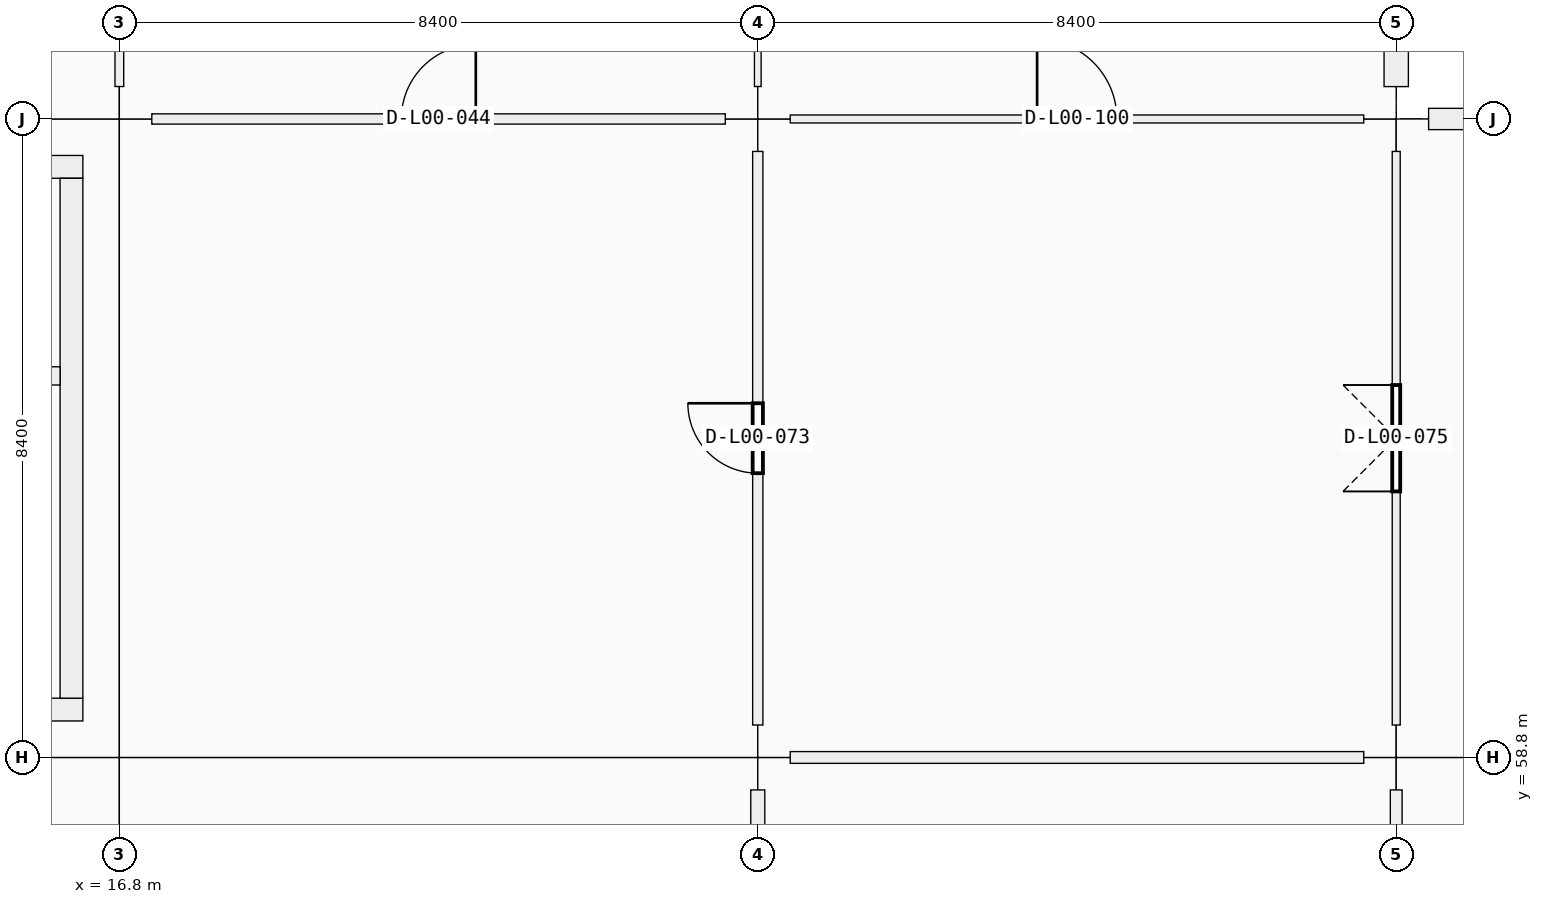
"""IFC4 building model, lengths in metres.
Left out: names, types, materials, properties, quantities, classifications, styles, units other than length and angle.
Written with IfcOpenShell. Run it as: python <this file> out.ifc"""

import sys

from ifc_helpers import new_model, si_unit, direction, frame, frame_2d, origin, origin_2d, place, context, subcontext, project, spatial, rectangle, extrude, element, fill, save


model = new_model("IFC4")
c1 = context("Model", 3, precision=1e-05, world=origin(), true_north=direction((0.0, 1.0)))
c2 = subcontext(c1, "Body", "Model", "MODEL_VIEW")
j1 = project(units=[si_unit("LENGTHUNIT", "METRE"), si_unit("PLANEANGLEUNIT", "RADIAN")], contexts=[c1])
p1 = place(None, origin())
s1 = spatial("IfcSite", under=j1, at=p1, CompositionType="ELEMENT")
p2 = place(p1, origin())
s2 = spatial("IfcBuilding", under=s1, at=p2, CompositionType="ELEMENT")
p3 = place(p2, origin())
s3 = spatial("IfcBuildingStorey", under=s2, at=p3, CompositionType="ELEMENT", Elevation=0.0)
for number, where, z_axis, x_axis in (
    (1, (16.8, 58.8, 0.0), (0.0, 0.0, 1.0), (1.0, 0.0, 0.0)),
    (2, (16.8, 67.2, 0.0), (0.0, 0.0, 1.0), (1.0, 0.0, 0.0)),
    (3, (25.2, 58.8, 0.0), (0.0, 0.0, 1.0), (1.0, 0.0, 0.0)),
    (4, (25.2, 67.2, 0.0), (0.0, 0.0, 1.0), (1.0, 0.0, 0.0)),
    (5, (33.6, 58.8, 0.0), (0.0, 0.0, 1.0), (1.0, 0.0, 0.0)),
    (6, (33.6, 67.2, 0.0), (0.0, 0.0, 1.0), (1.0, 0.0, 0.0)),
):
    element("IfcColumn", number, at=place(p3, frame(where, z_axis=z_axis, x_axis=x_axis)), inside=s3, PredefinedType="COLUMN", context=c2, shape_type="SweptSolid", body=[
        extrude(rectangle(XDim=0.85, YDim=0.85, at=origin_2d()), origin(), (0.0, 0.0, 1.0), 5.76),
    ])
p4 = place(p3, frame((33.6, 75.174, 0.0), z_axis=(0.0, 0.0, 1.0), x_axis=(0.0, -1.0, 0.0)))
e7 = element("IfcWall", 7, at=p4, inside=s3, PredefinedType="SOLIDWALL", context=c2, shape_type="SweptSolid", body=[
    extrude(rectangle(XDim=7.548, YDim=0.32, at=frame_2d((3.774, 0.0))), origin(), (0.0, 0.0, 1.0), 4.7),
])
p5 = place(p4, frame((2.824, 0.0, 0.9)))
e8 = element("IfcOpeningElement", 8, at=p5, cuts=e7, PredefinedType="OPENING", context=c2, shape_type="SweptSolid", body=[
    extrude(rectangle(XDim=1.9, YDim=1.75, at=frame_2d((0.95, 0.875))), frame((0.0, 0.16, 0.0), z_axis=(0.0, -1.0, 0.0), x_axis=(1.0, 0.0, 0.0)), (0.0, 0.0, 1.0), 0.32),
])
p6 = place(p3, frame((34.026, 67.2, 0.0), z_axis=(0.0, 0.0, 1.0), x_axis=(1.0, 0.0, 0.0)))
e9 = element("IfcWall", 9, at=p6, inside=s3, PredefinedType="SOLIDWALL", context=c2, shape_type="SweptSolid", body=[
    extrude(rectangle(XDim=7.548, YDim=0.28, at=frame_2d((3.774, 0.0))), origin(), (0.0, 0.0, 1.0), 4.7),
])
p7 = place(p6, frame((3.074, 0.0, 0.9)))
e10 = element("IfcOpeningElement", 10, at=p7, cuts=e9, PredefinedType="OPENING", context=c2, shape_type="SweptSolid", body=[
    extrude(rectangle(XDim=1.4, YDim=1.75, at=frame_2d((0.7, 0.875))), frame((0.0, 0.14, 0.0), z_axis=(0.0, -1.0, 0.0), x_axis=(1.0, 0.0, 0.0)), (0.0, 0.0, 1.0), 0.28),
])
p8 = place(p3, frame((16.32, 59.43, 0.0), z_axis=(0.0, 0.0, 1.0), x_axis=(-1.0, 0.0, 0.0)))
e11 = element("IfcWall", 11, at=p8, inside=s3, PredefinedType="SHEAR", context=c2, shape_type="SweptSolid", body=[
    extrude(rectangle(XDim=7.44, YDim=0.3, at=frame_2d((3.72, 0.0))), origin(), (0.0, 0.0, 1.0), 5.76),
])
p9 = place(p8, frame((1.28, 0.0, 0.0)))
e12 = element("IfcOpeningElement", 12, at=p9, cuts=e11, PredefinedType="OPENING", context=c2, shape_type="SweptSolid", body=[
    extrude(rectangle(XDim=1.5, YDim=2.15, at=frame_2d((0.75, 1.075))), frame((0.0, 0.15, 0.0), z_axis=(0.0, -1.0, 0.0), x_axis=(1.0, 0.0, 0.0)), (0.0, 0.0, 1.0), 0.3),
])
p10 = place(p3, frame((8.88, 66.57, 0.0), z_axis=(0.0, 0.0, 1.0), x_axis=(1.0, 0.0, 0.0)))
e13 = element("IfcWall", 13, at=p10, inside=s3, PredefinedType="SHEAR", context=c2, shape_type="SweptSolid", body=[
    extrude(rectangle(XDim=7.44, YDim=0.3, at=frame_2d((3.72, 0.0))), origin(), (0.0, 0.0, 1.0), 5.76),
])
p11 = place(p3, frame((16.17, 66.42, 0.0), z_axis=(0.0, 0.0, 1.0), x_axis=(0.0, -1.0, 0.0)))
e14 = element("IfcWall", 14, at=p11, inside=s3, PredefinedType="SHEAR", context=c2, shape_type="SweptSolid", body=[
    extrude(rectangle(XDim=6.84, YDim=0.3, at=frame_2d((3.42, 0.0))), origin(), (0.0, 0.0, 1.0), 5.76),
])
p12 = place(p3, frame((12.56, 63.82, 0.0), z_axis=(0.0, 0.0, 1.0), x_axis=(1.0, 0.0, 0.0)))
e15 = element("IfcWall", 15, at=p12, inside=s3, PredefinedType="SHEAR", context=c2, shape_type="SweptSolid", body=[
    extrude(rectangle(XDim=3.46, YDim=0.24, at=frame_2d((1.73, 0.0))), origin(), (0.0, 0.0, 1.0), 5.76),
])
p13 = place(p12, frame((1.18, 0.0, 0.0)))
e16 = element("IfcOpeningElement", 16, at=p13, cuts=e15, PredefinedType="OPENING", context=c2, shape_type="SweptSolid", body=[
    extrude(rectangle(XDim=1.1, YDim=2.15, at=frame_2d((0.55, 1.075))), frame((0.0, 0.12, 0.0), z_axis=(0.0, -1.0, 0.0), x_axis=(1.0, 0.0, 0.0)), (0.0, 0.0, 1.0), 0.24),
])
p14 = place(p3, frame((17.227, 67.2, 0.0), z_axis=(0.0, 0.0, 1.0), x_axis=(1.0, 0.0, 0.0)))
e17 = element("IfcWall", 17, at=p14, inside=s3, PredefinedType="PARTITIONING", context=c2, shape_type="SweptSolid", body=[
    extrude(rectangle(XDim=7.546, YDim=0.135, at=frame_2d((3.773, 0.0))), origin(), (0.0, 0.0, 1.0), 3.66),
])
p15 = place(p14, frame((3.283, 0.0, 0.0)))
e18 = element("IfcOpeningElement", 18, at=p15, cuts=e17, PredefinedType="OPENING", context=c2, shape_type="SweptSolid", body=[
    extrude(rectangle(XDim=0.98, YDim=2.18, at=frame_2d((0.49, 1.09))), frame((0.0, 0.067, 0.0), z_axis=(0.0, -1.0, 0.0), x_axis=(1.0, 0.0, 0.0)), (0.0, 0.0, 1.0), 0.135),
])
p16 = place(p3, frame((25.627, 58.8, 0.0), z_axis=(0.0, 0.0, 1.0), x_axis=(1.0, 0.0, 0.0)))
e19 = element("IfcWall", 19, at=p16, inside=s3, PredefinedType="PARTITIONING", context=c2, shape_type="SweptSolid", body=[
    extrude(rectangle(XDim=7.546, YDim=0.155, at=frame_2d((3.773, 0.0))), origin(), (0.0, 0.0, 1.0), 3.66),
])
p17 = place(p16, frame((3.243, 0.0, 0.0)))
e20 = element("IfcOpeningElement", 20, at=p17, cuts=e19, PredefinedType="OPENING", context=c2, shape_type="SweptSolid", body=[
    extrude(rectangle(XDim=1.06, YDim=2.25, at=frame_2d((0.53, 1.125))), frame((0.0, 0.078, 0.0), z_axis=(0.0, -1.0, 0.0), x_axis=(1.0, 0.0, 0.0)), (0.0, 0.0, 1.0), 0.155),
])
p18 = place(p3, frame((25.627, 67.2, 0.0), z_axis=(0.0, 0.0, 1.0), x_axis=(1.0, 0.0, 0.0)))
e21 = element("IfcWall", 21, at=p18, inside=s3, PredefinedType="PARTITIONING", context=c2, shape_type="SweptSolid", body=[
    extrude(rectangle(XDim=7.546, YDim=0.105, at=frame_2d((3.773, 0.0))), origin(), (0.0, 0.0, 1.0), 3.66),
])
p19 = place(p18, frame((3.248, 0.0, 0.0)))
e22 = element("IfcOpeningElement", 22, at=p19, cuts=e21, PredefinedType="OPENING", context=c2, shape_type="SweptSolid", body=[
    extrude(rectangle(XDim=1.05, YDim=2.12, at=frame_2d((0.525, 1.06))), frame((0.0, 0.052, 0.0), z_axis=(0.0, -1.0, 0.0), x_axis=(1.0, 0.0, 0.0)), (0.0, 0.0, 1.0), 0.105),
])
p20 = place(p3, frame((16.8, 67.627, 0.0), z_axis=(0.0, 0.0, 1.0), x_axis=(0.0, 1.0, 0.0)))
e23 = element("IfcWall", 23, at=p20, inside=s3, PredefinedType="PARTITIONING", context=c2, shape_type="SweptSolid", body=[
    extrude(rectangle(XDim=7.546, YDim=0.115, at=frame_2d((3.773, 0.0))), origin(), (0.0, 0.0, 1.0), 3.66),
])
p21 = place(p20, frame((3.248, 0.0, 0.0)))
e24 = element("IfcOpeningElement", 24, at=p21, cuts=e23, PredefinedType="OPENING", context=c2, shape_type="SweptSolid", body=[
    extrude(rectangle(XDim=1.05, YDim=2.12, at=frame_2d((0.525, 1.06))), frame((0.0, 0.058, 0.0), z_axis=(0.0, -1.0, 0.0), x_axis=(1.0, 0.0, 0.0)), (0.0, 0.0, 1.0), 0.115),
])
p22 = place(p3, frame((25.2, 50.827, 0.0), z_axis=(0.0, 0.0, 1.0), x_axis=(0.0, 1.0, 0.0)))
e25 = element("IfcWall", 25, at=p22, inside=s3, PredefinedType="PARTITIONING", context=c2, shape_type="SweptSolid", body=[
    extrude(rectangle(XDim=7.546, YDim=0.185, at=frame_2d((3.773, 0.0))), origin(), (0.0, 0.0, 1.0), 3.66),
])
p23 = place(p22, frame((3.303, 0.0, 0.0)))
e26 = element("IfcOpeningElement", 26, at=p23, cuts=e25, PredefinedType="OPENING", context=c2, shape_type="SweptSolid", body=[
    extrude(rectangle(XDim=0.94, YDim=2.15, at=frame_2d((0.47, 1.075))), frame((0.0, 0.093, 0.0), z_axis=(0.0, -1.0, 0.0), x_axis=(1.0, 0.0, 0.0)), (0.0, 0.0, 1.0), 0.185),
])
p24 = place(p3, frame((25.2, 59.227, 0.0), z_axis=(0.0, 0.0, 1.0), x_axis=(0.0, 1.0, 0.0)))
e27 = element("IfcWall", 27, at=p24, inside=s3, PredefinedType="PARTITIONING", context=c2, shape_type="SweptSolid", body=[
    extrude(rectangle(XDim=7.546, YDim=0.135, at=frame_2d((3.773, 0.0))), origin(), (0.0, 0.0, 1.0), 3.66),
])
p25 = place(p24, frame((3.313, 0.0, 0.0)))
e28 = element("IfcOpeningElement", 28, at=p25, cuts=e27, PredefinedType="OPENING", context=c2, shape_type="SweptSolid", body=[
    extrude(rectangle(XDim=0.92, YDim=2.15, at=frame_2d((0.46, 1.075))), frame((0.0, 0.067, 0.0), z_axis=(0.0, -1.0, 0.0), x_axis=(1.0, 0.0, 0.0)), (0.0, 0.0, 1.0), 0.135),
])
p26 = place(p3, frame((25.2, 67.627, 0.0), z_axis=(0.0, 0.0, 1.0), x_axis=(0.0, 1.0, 0.0)))
e29 = element("IfcWall", 29, at=p26, inside=s3, PredefinedType="PARTITIONING", context=c2, shape_type="SweptSolid", body=[
    extrude(rectangle(XDim=7.546, YDim=0.088, at=frame_2d((3.773, 0.0))), origin(), (0.0, 0.0, 1.0), 3.66),
])
p27 = place(p26, frame((3.288, 0.0, 0.0)))
e30 = element("IfcOpeningElement", 30, at=p27, cuts=e29, PredefinedType="OPENING", context=c2, shape_type="SweptSolid", body=[
    extrude(rectangle(XDim=0.97, YDim=2.12, at=frame_2d((0.485, 1.06))), frame((0.0, 0.044, 0.0), z_axis=(0.0, -1.0, 0.0), x_axis=(1.0, 0.0, 0.0)), (0.0, 0.0, 1.0), 0.088),
])
p28 = place(p3, frame((33.6, 50.827, 0.0), z_axis=(0.0, 0.0, 1.0), x_axis=(0.0, 1.0, 0.0)))
e31 = element("IfcWall", 31, at=p28, inside=s3, PredefinedType="PARTITIONING", context=c2, shape_type="SweptSolid", body=[
    extrude(rectangle(XDim=7.546, YDim=0.155, at=frame_2d((3.773, 0.0))), origin(), (0.0, 0.0, 1.0), 3.66),
])
p29 = place(p28, frame((3.048, 0.0, 0.0)))
e32 = element("IfcOpeningElement", 32, at=p29, cuts=e31, PredefinedType="OPENING", context=c2, shape_type="SweptSolid", body=[
    extrude(rectangle(XDim=1.45, YDim=2.2, at=frame_2d((0.725, 1.1))), frame((0.0, 0.078, 0.0), z_axis=(0.0, -1.0, 0.0), x_axis=(1.0, 0.0, 0.0)), (0.0, 0.0, 1.0), 0.155),
])
p30 = place(p3, frame((33.6, 59.227, 0.0), z_axis=(0.0, 0.0, 1.0), x_axis=(0.0, 1.0, 0.0)))
e33 = element("IfcWall", 33, at=p30, inside=s3, PredefinedType="PARTITIONING", context=c2, shape_type="SweptSolid", body=[
    extrude(rectangle(XDim=7.546, YDim=0.105, at=frame_2d((3.773, 0.0))), origin(), (0.0, 0.0, 1.0), 3.66),
])
p31 = place(p30, frame((3.073, 0.0, 0.0)))
e34 = element("IfcOpeningElement", 34, at=p31, cuts=e33, PredefinedType="OPENING", context=c2, shape_type="SweptSolid", body=[
    extrude(rectangle(XDim=1.4, YDim=2.25, at=frame_2d((0.7, 1.125))), frame((0.0, 0.052, 0.0), z_axis=(0.0, -1.0, 0.0), x_axis=(1.0, 0.0, 0.0)), (0.0, 0.0, 1.0), 0.105),
])
p32 = place(p15, origin())
e35 = element("IfcDoor", 35, at=p32, inside=s3, OperationType="SINGLE_SWING_RIGHT", PredefinedType="DOOR", context=c2, shape_type="SweptSolid", body=[
    extrude(rectangle(XDim=0.98, YDim=2.18, at=frame_2d((0.49, 1.09))), frame((0.0, 0.025, 0.0), z_axis=(0.0, -1.0, 0.0), x_axis=(1.0, 0.0, 0.0)), (0.0, 0.0, 1.0), 0.05),
])
fill(e18, e35)
p33 = place(p25, origin())
e36 = element("IfcDoor", 36, at=p33, inside=s3, OperationType="SINGLE_SWING_RIGHT", PredefinedType="DOOR", context=c2, shape_type="SweptSolid", body=[
    extrude(rectangle(XDim=0.92, YDim=2.15, at=frame_2d((0.46, 1.075))), frame((0.0, 0.025, 0.0), z_axis=(0.0, -1.0, 0.0), x_axis=(1.0, 0.0, 0.0)), (0.0, 0.0, 1.0), 0.05),
])
fill(e28, e36)
p34 = place(p31, origin())
e37 = element("IfcDoor", 37, at=p34, inside=s3, OperationType="DOUBLE_DOOR_SINGLE_SWING", PredefinedType="DOOR", context=c2, shape_type="SweptSolid", body=[
    extrude(rectangle(XDim=1.4, YDim=2.25, at=frame_2d((0.7, 1.125))), frame((0.0, 0.025, 0.0), z_axis=(0.0, -1.0, 0.0), x_axis=(1.0, 0.0, 0.0)), (0.0, 0.0, 1.0), 0.05),
])
fill(e34, e37)
p35 = place(p19, origin())
e38 = element("IfcDoor", 38, at=p35, inside=s3, OperationType="SINGLE_SWING_LEFT", PredefinedType="DOOR", context=c2, shape_type="SweptSolid", body=[
    extrude(rectangle(XDim=1.05, YDim=2.12, at=frame_2d((0.525, 1.06))), frame((0.0, 0.025, 0.0), z_axis=(0.0, -1.0, 0.0), x_axis=(1.0, 0.0, 0.0)), (0.0, 0.0, 1.0), 0.05),
])
fill(e22, e38)
p36 = place(p17, origin())
e39 = element("IfcDoor", 39, at=p36, inside=s3, OperationType="SINGLE_SWING_RIGHT", PredefinedType="DOOR", context=c2, shape_type="SweptSolid", body=[
    extrude(rectangle(XDim=1.06, YDim=2.25, at=frame_2d((0.53, 1.125))), frame((0.0, 0.025, 0.0), z_axis=(0.0, -1.0, 0.0), x_axis=(1.0, 0.0, 0.0)), (0.0, 0.0, 1.0), 0.05),
])
fill(e20, e39)
save(model, sys.argv[1])
